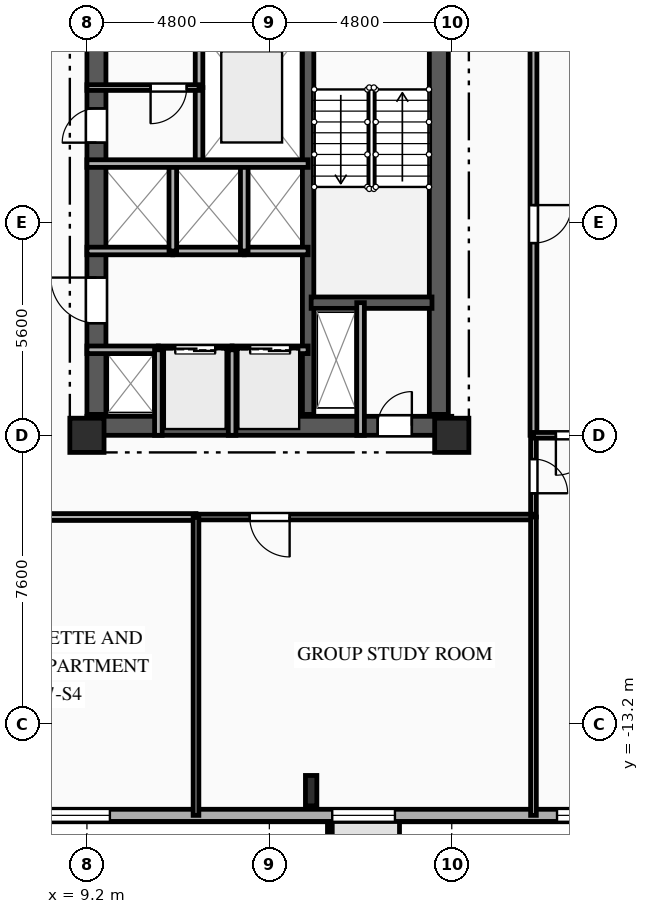
"""IFC4 building model, lengths in metres.
Left out: names, types, materials, properties, quantities, classifications, styles, units other than length and angle.
Written with IfcOpenShell. Run it as: python <this file> out.ifc"""

import sys

from ifc_helpers import new_model, si_unit, direction, frame, frame_2d, origin, origin_2d, place, context, subcontext, project, spatial, rectangle, i_section, extrude, element, fill, save


model = new_model("IFC4")
c1 = context("Model", 3, precision=1e-05, world=origin(), true_north=direction((0.0, 1.0)))
c2 = subcontext(c1, "Body", "Model", "MODEL_VIEW")
j1 = project(units=[si_unit("LENGTHUNIT", "METRE"), si_unit("PLANEANGLEUNIT", "RADIAN")], contexts=[c1])
p1 = place(None, origin())
s1 = spatial("IfcSite", under=j1, at=p1, CompositionType="ELEMENT")
p2 = place(p1, origin())
s2 = spatial("IfcBuilding", under=s1, at=p2, CompositionType="ELEMENT")
p3 = place(p2, frame((0.0, 0.0, 134.35)))
s3 = spatial("IfcBuildingStorey", under=s2, at=p3, CompositionType="ELEMENT", Elevation=134.35)
for number, where, z_axis, x_axis in (
    (1, (9.2, -5.6, 0.0), (0.0, 0.0, 1.0), (1.0, 0.0, 0.0)),
    (2, (18.8, -5.6, 0.0), (0.0, 0.0, 1.0), (1.0, 0.0, 0.0)),
):
    element("IfcColumn", number, at=place(p3, frame(where, z_axis=z_axis, x_axis=x_axis)), inside=s3, PredefinedType="COLUMN", context=c2, shape_type="SweptSolid", body=[
        extrude(rectangle(XDim=0.9, YDim=0.9, at=origin_2d()), origin(), (0.0, 0.0, 1.0), 3.35),
    ])
p4 = place(p3, frame((15.1, -14.95, 0.0), z_axis=(0.0, 0.0, 1.0), x_axis=(1.0, 0.0, 0.0)))
e3 = element("IfcColumn", 3, at=p4, inside=s3, PredefinedType="COLUMN", context=c2, shape_type="SweptSolid", body=[
    extrude(i_section(OverallWidth=0.3, OverallDepth=0.8, WebThickness=0.018, FlangeThickness=0.033, FilletRadius=0.03, at=origin_2d()), origin(), (0.0, 0.0, 1.0), 3.35),
])
p5 = place(p3, frame((23.8, -15.6, 0.0), z_axis=(0.0, 0.0, 1.0), x_axis=(-1.0, 0.0, 0.0)))
e4 = element("IfcWall", 4, at=p5, inside=s3, PredefinedType="SOLIDWALL", context=c2, shape_type="SweptSolid", body=[
    extrude(rectangle(XDim=49.6, YDim=0.32, at=frame_2d((24.8, 0.0))), origin(), (0.0, 0.0, 1.0), 3.04),
])
p6 = place(p5, frame((1.13, 0.0, 0.85)))
e5 = element("IfcOpeningElement", 5, at=p6, cuts=e4, PredefinedType="OPENING", context=c2, shape_type="SweptSolid", body=[
    extrude(rectangle(XDim=1.1, YDim=1.85, at=frame_2d((0.55, 0.925))), frame((0.0, 0.17, 0.0), z_axis=(0.0, -1.0, 0.0), x_axis=(1.0, 0.0, 0.0)), (0.0, 0.0, 1.0), 0.34),
])
p7 = place(p5, frame((6.495, 0.0, 0.85)))
e6 = element("IfcOpeningElement", 6, at=p7, cuts=e4, PredefinedType="OPENING", context=c2, shape_type="SweptSolid", body=[
    extrude(rectangle(XDim=1.65, YDim=1.85, at=frame_2d((0.825, 0.925))), frame((0.0, 0.17, 0.0), z_axis=(0.0, -1.0, 0.0), x_axis=(1.0, 0.0, 0.0)), (0.0, 0.0, 1.0), 0.34),
])
p8 = place(p5, frame((13.996, 0.0, 0.85)))
e7 = element("IfcOpeningElement", 7, at=p8, cuts=e4, PredefinedType="OPENING", context=c2, shape_type="SweptSolid", body=[
    extrude(rectangle(XDim=2.2, YDim=1.85, at=frame_2d((1.1, 0.925))), frame((0.0, 0.17, 0.0), z_axis=(0.0, -1.0, 0.0), x_axis=(1.0, 0.0, 0.0)), (0.0, 0.0, 1.0), 0.34),
])
p9 = place(p5, frame((22.396, 0.0, 0.85)))
e8 = element("IfcOpeningElement", 8, at=p9, cuts=e4, PredefinedType="OPENING", context=c2, shape_type="SweptSolid", body=[
    extrude(rectangle(XDim=2.2, YDim=1.85, at=frame_2d((1.1, 0.925))), frame((0.0, 0.17, 0.0), z_axis=(0.0, -1.0, 0.0), x_axis=(1.0, 0.0, 0.0)), (0.0, 0.0, 1.0), 0.34),
])
p10 = place(p5, frame((30.2, 0.0, 0.85)))
e9 = element("IfcOpeningElement", 9, at=p10, cuts=e4, PredefinedType="OPENING", context=c2, shape_type="SweptSolid", body=[
    extrude(rectangle(XDim=2.2, YDim=1.85, at=frame_2d((1.1, 0.925))), frame((0.0, 0.17, 0.0), z_axis=(0.0, -1.0, 0.0), x_axis=(1.0, 0.0, 0.0)), (0.0, 0.0, 1.0), 0.34),
])
p11 = place(p5, frame((38.673, 0.0, 0.85)))
e10 = element("IfcOpeningElement", 10, at=p11, cuts=e4, PredefinedType="OPENING", context=c2, shape_type="SweptSolid", body=[
    extrude(rectangle(XDim=1.65, YDim=1.85, at=frame_2d((0.825, 0.925))), frame((0.0, 0.17, 0.0), z_axis=(0.0, -1.0, 0.0), x_axis=(1.0, 0.0, 0.0)), (0.0, 0.0, 1.0), 0.34),
])
p12 = place(p5, frame((46.175, 0.0, 0.85)))
e11 = element("IfcOpeningElement", 11, at=p12, cuts=e4, PredefinedType="OPENING", context=c2, shape_type="SweptSolid", body=[
    extrude(rectangle(XDim=1.65, YDim=1.85, at=frame_2d((0.825, 0.925))), frame((0.0, 0.17, 0.0), z_axis=(0.0, -1.0, 0.0), x_axis=(1.0, 0.0, 0.0)), (0.0, 0.0, 1.0), 0.34),
])
p13 = place(p3, frame((9.2, -5.35, 0.0), z_axis=(0.0, 0.0, 1.0), x_axis=(1.0, 0.0, 0.0)))
e12 = element("IfcWall", 12, at=p13, inside=s3, PredefinedType="SHEAR", context=c2, shape_type="SweptSolid", body=[
    extrude(rectangle(XDim=9.6, YDim=0.5, at=frame_2d((4.8, 0.0))), origin(), (0.0, 0.0, 1.0), 3.04),
])
p14 = place(p13, frame((7.65, 0.0, 0.0)))
e13 = element("IfcOpeningElement", 13, at=p14, cuts=e12, PredefinedType="OPENING", context=c2, shape_type="SweptSolid", body=[
    extrude(rectangle(XDim=0.9, YDim=2.1, at=frame_2d((0.45, 1.05))), frame((0.0, 0.26, 0.0), z_axis=(0.0, -1.0, 0.0), x_axis=(1.0, 0.0, 0.0)), (0.0, 0.0, 1.0), 0.52),
])
p15 = place(p3, frame((9.45, -5.05, 0.0), z_axis=(0.0, 0.0, 1.0), x_axis=(0.0, 1.0, 0.0)))
e14 = element("IfcWall", 14, at=p15, inside=s3, PredefinedType="SHEAR", context=c2, shape_type="SweptSolid", body=[
    extrude(rectangle(XDim=10.1, YDim=0.5, at=frame_2d((5.05, 0.0))), origin(), (0.0, 0.0, 1.0), 3.04),
])
p16 = place(p15, frame((7.15, 0.0, 0.0)))
e15 = element("IfcOpeningElement", 15, at=p16, cuts=e14, PredefinedType="OPENING", context=c2, shape_type="SweptSolid", body=[
    extrude(rectangle(XDim=0.9, YDim=2.1, at=frame_2d((0.45, 1.05))), frame((0.0, 0.26, 0.0), z_axis=(0.0, -1.0, 0.0), x_axis=(1.0, 0.0, 0.0)), (0.0, 0.0, 1.0), 0.52),
])
p17 = place(p15, frame((2.4, 0.0, 0.0)))
e16 = element("IfcOpeningElement", 16, at=p17, cuts=e14, PredefinedType="OPENING", context=c2, shape_type="SweptSolid", body=[
    extrude(rectangle(XDim=1.2, YDim=2.15, at=frame_2d((0.6, 1.075))), frame((0.0, 0.26, 0.0), z_axis=(0.0, -1.0, 0.0), x_axis=(1.0, 0.0, 0.0)), (0.0, 0.0, 1.0), 0.52),
])
p18 = place(p3, frame((18.46, -5.05, 0.0), z_axis=(0.0, 0.0, 1.0), x_axis=(0.0, 1.0, 0.0)))
e17 = element("IfcWall", 17, at=p18, inside=s3, PredefinedType="SHEAR", context=c2, shape_type="SweptSolid", body=[
    extrude(rectangle(XDim=10.1, YDim=0.5, at=frame_2d((5.05, 0.0))), origin(), (0.0, 0.0, 1.0), 3.04),
])
p19 = place(p3, frame((15.02, -5.05, 0.0), z_axis=(0.0, 0.0, 1.0), x_axis=(0.0, 1.0, 0.0)))
e18 = element("IfcWall", 18, at=p19, inside=s3, PredefinedType="SHEAR", context=c2, shape_type="SweptSolid", body=[
    extrude(rectangle(XDim=10.1, YDim=0.3, at=frame_2d((5.05, 0.0))), origin(), (0.0, 0.0, 1.0), 3.04),
])
p20 = place(p3, frame((15.1, -2.11, 0.0), z_axis=(0.0, 0.0, 1.0), x_axis=(1.0, 0.0, 0.0)))
e19 = element("IfcWall", 19, at=p20, inside=s3, PredefinedType="SHEAR", context=c2, shape_type="SweptSolid", body=[
    extrude(rectangle(XDim=3.18, YDim=0.3, at=frame_2d((1.59, 0.0))), origin(), (0.0, 0.0, 1.0), 3.04),
])
p21 = place(p3, frame((16.4, -2.11, 0.0), z_axis=(0.0, 0.0, 1.0), x_axis=(0.0, -1.0, 0.0)))
e20 = element("IfcWall", 20, at=p21, inside=s3, PredefinedType="PARTITIONING", context=c2, shape_type="SweptSolid", body=[
    extrude(rectangle(XDim=3.49, YDim=0.2, at=frame_2d((1.745, 0.0))), origin(), (0.0, 0.0, 1.0), 3.04),
])
p22 = place(p3, frame((12.15, 3.55, 0.0), z_axis=(0.0, 0.0, 1.0), x_axis=(0.0, -1.0, 0.0)))
e21 = element("IfcWall", 21, at=p22, inside=s3, PredefinedType="PARTITIONING", context=c2, shape_type="SweptSolid", body=[
    extrude(rectangle(XDim=2.0, YDim=0.2, at=frame_2d((1.0, 0.0))), origin(), (0.0, 0.0, 1.0), 3.04),
])
p23 = place(p3, frame((12.15, 5.6, 0.0), z_axis=(0.0, 0.0, 1.0), x_axis=(0.0, -1.0, 0.0)))
e22 = element("IfcWall", 22, at=p23, inside=s3, PredefinedType="PARTITIONING", context=c2, shape_type="SweptSolid", body=[
    extrude(rectangle(XDim=2.05, YDim=0.2, at=frame_2d((1.025, 0.0))), origin(), (0.0, 0.0, 1.0), 3.04),
])
p24 = place(p3, frame((12.15, 3.55, 0.0), z_axis=(0.0, 0.0, 1.0), x_axis=(-1.0, 0.0, 0.0)))
e23 = element("IfcWall", 23, at=p24, inside=s3, PredefinedType="PARTITIONING", context=c2, shape_type="SweptSolid", body=[
    extrude(rectangle(XDim=2.95, YDim=0.15, at=frame_2d((1.475, 0.0))), origin(), (0.0, 0.0, 1.0), 3.04),
])
p25 = place(p24, frame((0.325, 0.0, 0.0)))
e24 = element("IfcOpeningElement", 24, at=p25, cuts=e23, PredefinedType="OPENING", context=c2, shape_type="SweptSolid", body=[
    extrude(rectangle(XDim=0.95, YDim=2.1, at=frame_2d((0.475, 1.05))), frame((0.0, 0.085, 0.0), z_axis=(0.0, -1.0, 0.0), x_axis=(1.0, 0.0, 0.0)), (0.0, 0.0, 1.0), 0.17),
])
p26 = place(p3, frame((9.2, -3.35, 0.0), z_axis=(0.0, 0.0, 1.0), x_axis=(1.0, 0.0, 0.0)))
e25 = element("IfcWall", 25, at=p26, inside=s3, PredefinedType="PARTITIONING", context=c2, shape_type="SweptSolid", body=[
    extrude(rectangle(XDim=1.88, YDim=0.2, at=frame_2d((0.94, 0.0))), origin(), (0.0, 0.0, 1.0), 2.755),
])
p27 = place(p3, frame((11.08, -3.35, 0.0), z_axis=(0.0, 0.0, 1.0), x_axis=(1.0, 0.0, 0.0)))
e26 = element("IfcWall", 26, at=p27, inside=s3, PredefinedType="PARTITIONING", context=c2, shape_type="SweptSolid", body=[
    extrude(rectangle(XDim=1.94, YDim=0.2, at=frame_2d((0.97, 0.0))), origin(), (0.0, 0.0, 1.0), 3.04),
])
p28 = place(p27, frame((0.445, 0.0, 0.0)))
e27 = element("IfcOpeningElement", 27, at=p28, cuts=e26, PredefinedType="OPENING", context=c2, shape_type="SweptSolid", body=[
    extrude(rectangle(XDim=1.05, YDim=2.1, at=frame_2d((0.525, 1.05))), frame((0.0, 0.11, 0.0), z_axis=(0.0, -1.0, 0.0), x_axis=(1.0, 0.0, 0.0)), (0.0, 0.0, 1.0), 0.22),
])
p29 = place(p3, frame((13.02, -3.35, 0.0), z_axis=(0.0, 0.0, 1.0), x_axis=(1.0, 0.0, 0.0)))
e28 = element("IfcWall", 28, at=p29, inside=s3, PredefinedType="PARTITIONING", context=c2, shape_type="SweptSolid", body=[
    extrude(rectangle(XDim=2.0, YDim=0.2, at=frame_2d((1.0, 0.0))), origin(), (0.0, 0.0, 1.0), 3.04),
])
p30 = place(p29, frame((0.475, 0.0, 0.0)))
e29 = element("IfcOpeningElement", 29, at=p30, cuts=e28, PredefinedType="OPENING", context=c2, shape_type="SweptSolid", body=[
    extrude(rectangle(XDim=1.05, YDim=2.1, at=frame_2d((0.525, 1.05))), frame((0.0, 0.11, 0.0), z_axis=(0.0, -1.0, 0.0), x_axis=(1.0, 0.0, 0.0)), (0.0, 0.0, 1.0), 0.22),
])
p31 = place(p3, frame((11.46, -0.75, 0.0), z_axis=(0.0, 0.0, 1.0), x_axis=(-1.0, 0.0, 0.0)))
e30 = element("IfcWall", 30, at=p31, inside=s3, PredefinedType="PARTITIONING", context=c2, shape_type="SweptSolid", body=[
    extrude(rectangle(XDim=2.26, YDim=0.2, at=frame_2d((1.13, 0.0))), origin(), (0.0, 0.0, 1.0), 3.04),
])
p32 = place(p3, frame((13.34, -0.75, 0.0), z_axis=(0.0, 0.0, 1.0), x_axis=(-1.0, 0.0, 0.0)))
e31 = element("IfcWall", 31, at=p32, inside=s3, PredefinedType="PARTITIONING", context=c2, shape_type="SweptSolid", body=[
    extrude(rectangle(XDim=1.88, YDim=0.2, at=frame_2d((0.94, 0.0))), origin(), (0.0, 0.0, 1.0), 3.04),
])
p33 = place(p3, frame((15.02, -0.75, 0.0), z_axis=(0.0, 0.0, 1.0), x_axis=(-1.0, 0.0, 0.0)))
e32 = element("IfcWall", 32, at=p33, inside=s3, PredefinedType="PARTITIONING", context=c2, shape_type="SweptSolid", body=[
    extrude(rectangle(XDim=1.68, YDim=0.2, at=frame_2d((0.84, 0.0))), origin(), (0.0, 0.0, 1.0), 3.04),
])
for number, where, z_axis, x_axis in (
    (33, (11.08, -5.6, 0.0), (0.0, 0.0, 1.0), (0.0, 1.0, 0.0)),
    (34, (13.02, -5.6, 0.0), (0.0, 0.0, 1.0), (0.0, 1.0, 0.0)),
):
    element("IfcWall", number, at=place(p3, frame(where, z_axis=z_axis, x_axis=x_axis)), inside=s3, PredefinedType="PARTITIONING", context=c2, shape_type="SweptSolid", body=[
        extrude(rectangle(XDim=2.25, YDim=0.2, at=frame_2d((1.125, 0.0))), origin(), (0.0, 0.0, 1.0), 3.04),
    ])
for number, where, z_axis, x_axis in (
    (35, (11.46, -0.75, 0.0), (0.0, 0.0, 1.0), (0.0, 1.0, 0.0)),
    (36, (13.34, -0.75, 0.0), (0.0, 0.0, 1.0), (0.0, 1.0, 0.0)),
):
    element("IfcWall", number, at=place(p3, frame(where, z_axis=z_axis, x_axis=x_axis)), inside=s3, PredefinedType="PARTITIONING", context=c2, shape_type="SweptSolid", body=[
        extrude(rectangle(XDim=2.3, YDim=0.2, at=frame_2d((1.15, 0.0))), origin(), (0.0, 0.0, 1.0), 3.04),
    ])
p34 = place(p3, frame((20.95, -5.6, 0.0), z_axis=(0.0, 0.0, 1.0), x_axis=(0.0, -1.0, 0.0)))
e37 = element("IfcWall", 37, at=p34, inside=s3, PredefinedType="PARTITIONING", context=c2, shape_type="SweptSolid", body=[
    extrude(rectangle(XDim=2.15, YDim=0.15, at=frame_2d((1.075, 0.0))), origin(), (0.0, 0.0, 1.0), 3.04),
])
p35 = place(p34, frame((0.625, 0.0, 0.0)))
e38 = element("IfcOpeningElement", 38, at=p35, cuts=e37, PredefinedType="OPENING", context=c2, shape_type="SweptSolid", body=[
    extrude(rectangle(XDim=0.9, YDim=2.1, at=frame_2d((0.45, 1.05))), frame((0.0, 0.085, 0.0), z_axis=(0.0, -1.0, 0.0), x_axis=(1.0, 0.0, 0.0)), (0.0, 0.0, 1.0), 0.17),
])
p36 = place(p3, frame((12.07, -7.75, 0.0), z_axis=(0.0, 0.0, 1.0), x_axis=(-1.0, 0.0, 0.0)))
e39 = element("IfcWall", 39, at=p36, inside=s3, PredefinedType="PARTITIONING", context=c2, shape_type="SweptSolid", body=[
    extrude(rectangle(XDim=5.93, YDim=0.18, at=frame_2d((2.965, 0.0))), origin(), (0.0, 0.0, 1.0), 3.04),
])
p37 = place(p36, frame((3.879, 0.0, 0.0)))
e40 = element("IfcOpeningElement", 40, at=p37, cuts=e39, PredefinedType="OPENING", context=c2, shape_type="SweptSolid", body=[
    extrude(rectangle(XDim=1.0, YDim=2.15, at=frame_2d((0.5, 1.075))), frame((0.0, 0.1, 0.0), z_axis=(0.0, -1.0, 0.0), x_axis=(1.0, 0.0, 0.0)), (0.0, 0.0, 1.0), 0.2),
])
p38 = place(p3, frame((20.95, -7.75, 0.0), z_axis=(0.0, 0.0, 1.0), x_axis=(-1.0, 0.0, 0.0)))
e41 = element("IfcWall", 41, at=p38, inside=s3, PredefinedType="PARTITIONING", context=c2, shape_type="SweptSolid", body=[
    extrude(rectangle(XDim=8.88, YDim=0.15, at=frame_2d((4.44, 0.0))), origin(), (0.0, 0.0, 1.0), 3.04),
])
p39 = place(p38, frame((6.416, 0.0, 0.0)))
e42 = element("IfcOpeningElement", 42, at=p39, cuts=e41, PredefinedType="OPENING", context=c2, shape_type="SweptSolid", body=[
    extrude(rectangle(XDim=1.05, YDim=2.15, at=frame_2d((0.525, 1.075))), frame((0.0, 0.085, 0.0), z_axis=(0.0, -1.0, 0.0), x_axis=(1.0, 0.0, 0.0)), (0.0, 0.0, 1.0), 0.17),
])
p40 = place(p3, frame((20.95, 8.5, 0.0), z_axis=(0.0, 0.0, 1.0), x_axis=(0.0, -1.0, 0.0)))
e43 = element("IfcWall", 43, at=p40, inside=s3, PredefinedType="PARTITIONING", context=c2, shape_type="SweptSolid", body=[
    extrude(rectangle(XDim=14.1, YDim=0.18, at=frame_2d((7.05, 0.0))), origin(), (0.0, 0.0, 1.0), 3.04),
])
p41 = place(p40, frame((8.042, 0.0, 0.0)))
e44 = element("IfcOpeningElement", 44, at=p41, cuts=e43, PredefinedType="OPENING", context=c2, shape_type="SweptSolid", body=[
    extrude(rectangle(XDim=1.0, YDim=2.15, at=frame_2d((0.5, 1.075))), frame((0.0, 0.1, 0.0), z_axis=(0.0, -1.0, 0.0), x_axis=(1.0, 0.0, 0.0)), (0.0, 0.0, 1.0), 0.2),
])
p42 = place(p3, frame((23.18, -5.6, 0.0), z_axis=(0.0, 0.0, 1.0), x_axis=(-1.0, 0.0, 0.0)))
e45 = element("IfcWall", 45, at=p42, inside=s3, PredefinedType="PARTITIONING", context=c2, shape_type="SweptSolid", body=[
    extrude(rectangle(XDim=2.23, YDim=0.15, at=frame_2d((1.115, 0.0))), origin(), (0.0, 0.0, 1.0), 3.04),
])
p43 = place(p42, frame((0.59, 0.0, 0.0)))
e46 = element("IfcOpeningElement", 46, at=p43, cuts=e45, PredefinedType="OPENING", context=c2, shape_type="SweptSolid", body=[
    extrude(rectangle(XDim=1.05, YDim=2.15, at=frame_2d((0.525, 1.075))), frame((0.0, 0.085, 0.0), z_axis=(0.0, -1.0, 0.0), x_axis=(1.0, 0.0, 0.0)), (0.0, 0.0, 1.0), 0.17),
])
for number, where, z_axis, x_axis in (
    (47, (20.95, -15.6, 0.0), (0.0, 0.0, 1.0), (0.0, 1.0, 0.0)),
    (48, (12.07, -7.75, 0.0), (0.0, 0.0, 1.0), (0.0, -1.0, 0.0)),
):
    element("IfcWall", number, at=place(p3, frame(where, z_axis=z_axis, x_axis=x_axis)), inside=s3, PredefinedType="PARTITIONING", context=c2, shape_type="SweptSolid", body=[
        extrude(rectangle(XDim=7.85, YDim=0.15, at=frame_2d((3.925, 0.0))), origin(), (0.0, 0.0, 1.0), 3.04),
    ])
p44 = place(p3, frame((9.2, 1.55, 0.0), z_axis=(0.0, 0.0, 1.0), x_axis=(1.0, 0.0, 0.0)))
e49 = element("IfcWall", 49, at=p44, inside=s3, PredefinedType="PARTITIONING", context=c2, shape_type="SweptSolid", body=[
    extrude(rectangle(XDim=5.82, YDim=0.2, at=frame_2d((2.91, 0.0))), origin(), (0.0, 0.0, 1.0), 3.04),
])
p45 = place(p6, origin())
e50 = element("IfcWindow", 50, at=p45, inside=s3, PartitioningType="SINGLE_PANEL", PredefinedType="WINDOW", context=c2, shape_type="SweptSolid", body=[
    extrude(rectangle(XDim=1.1, YDim=1.85, at=frame_2d((0.55, 0.925))), frame((0.0, 0.03, 0.0), z_axis=(0.0, -1.0, 0.0), x_axis=(1.0, 0.0, 0.0)), (0.0, 0.0, 1.0), 0.06),
])
fill(e5, e50)
p46 = place(p7, origin())
e51 = element("IfcWindow", 51, at=p46, inside=s3, PartitioningType="SINGLE_PANEL", PredefinedType="WINDOW", context=c2, shape_type="SweptSolid", body=[
    extrude(rectangle(XDim=1.65, YDim=1.85, at=frame_2d((0.825, 0.925))), frame((0.0, 0.03, 0.0), z_axis=(0.0, -1.0, 0.0), x_axis=(1.0, 0.0, 0.0)), (0.0, 0.0, 1.0), 0.06),
])
fill(e6, e51)
p47 = place(p8, origin())
e52 = element("IfcWindow", 52, at=p47, inside=s3, PartitioningType="SINGLE_PANEL", PredefinedType="WINDOW", context=c2, shape_type="SweptSolid", body=[
    extrude(rectangle(XDim=2.2, YDim=1.85, at=frame_2d((1.1, 0.925))), frame((0.0, 0.03, 0.0), z_axis=(0.0, -1.0, 0.0), x_axis=(1.0, 0.0, 0.0)), (0.0, 0.0, 1.0), 0.06),
])
fill(e7, e52)
p48 = place(p14, origin())
e53 = element("IfcDoor", 53, at=p48, inside=s3, OperationType="SINGLE_SWING_RIGHT", PredefinedType="DOOR", context=c2, shape_type="SweptSolid", body=[
    extrude(rectangle(XDim=0.9, YDim=2.1, at=frame_2d((0.45, 1.05))), frame((0.0, 0.025, 0.0), z_axis=(0.0, -1.0, 0.0), x_axis=(1.0, 0.0, 0.0)), (0.0, 0.0, 1.0), 0.05),
])
fill(e13, e53)
p49 = place(p25, origin())
e54 = element("IfcDoor", 54, at=p49, inside=s3, OperationType="SINGLE_SWING_RIGHT", PredefinedType="DOOR", context=c2, shape_type="SweptSolid", body=[
    extrude(rectangle(XDim=0.95, YDim=2.1, at=frame_2d((0.475, 1.05))), frame((0.0, 0.025, 0.0), z_axis=(0.0, -1.0, 0.0), x_axis=(1.0, 0.0, 0.0)), (0.0, 0.0, 1.0), 0.05),
])
fill(e24, e54)
p50 = place(p16, origin())
e55 = element("IfcDoor", 55, at=p50, inside=s3, OperationType="SINGLE_SWING_LEFT", PredefinedType="DOOR", context=c2, shape_type="SweptSolid", body=[
    extrude(rectangle(XDim=0.9, YDim=2.1, at=frame_2d((0.45, 1.05))), frame((0.0, 0.025, 0.0), z_axis=(0.0, -1.0, 0.0), x_axis=(1.0, 0.0, 0.0)), (0.0, 0.0, 1.0), 0.05),
])
fill(e15, e55)
p51 = place(p28, origin())
e56 = element("IfcDoor", 56, at=p51, inside=s3, OperationType="DOUBLE_DOOR_SLIDING", PredefinedType="DOOR", context=c2, shape_type="SweptSolid", body=[
    extrude(rectangle(XDim=1.05, YDim=2.1, at=frame_2d((0.525, 1.05))), frame((0.0, 0.025, 0.0), z_axis=(0.0, -1.0, 0.0), x_axis=(1.0, 0.0, 0.0)), (0.0, 0.0, 1.0), 0.05),
])
fill(e27, e56)
p52 = place(p30, origin())
e57 = element("IfcDoor", 57, at=p52, inside=s3, OperationType="DOUBLE_DOOR_SLIDING", PredefinedType="DOOR", context=c2, shape_type="SweptSolid", body=[
    extrude(rectangle(XDim=1.05, YDim=2.1, at=frame_2d((0.525, 1.05))), frame((0.0, 0.025, 0.0), z_axis=(0.0, -1.0, 0.0), x_axis=(1.0, 0.0, 0.0)), (0.0, 0.0, 1.0), 0.05),
])
fill(e29, e57)
p53 = place(p17, origin())
e58 = element("IfcDoor", 58, at=p53, inside=s3, OperationType="SINGLE_SWING_RIGHT", PredefinedType="DOOR", context=c2, shape_type="SweptSolid", body=[
    extrude(rectangle(XDim=1.2, YDim=2.15, at=frame_2d((0.6, 1.075))), frame((0.0, 0.025, 0.0), z_axis=(0.0, -1.0, 0.0), x_axis=(1.0, 0.0, 0.0)), (0.0, 0.0, 1.0), 0.05),
])
fill(e16, e58)
p54 = place(p35, origin())
e59 = element("IfcDoor", 59, at=p54, inside=s3, OperationType="SINGLE_SWING_RIGHT", PredefinedType="DOOR", context=c2, shape_type="SweptSolid", body=[
    extrude(rectangle(XDim=0.9, YDim=2.1, at=frame_2d((0.45, 1.05))), frame((0.0, 0.025, 0.0), z_axis=(0.0, -1.0, 0.0), x_axis=(1.0, 0.0, 0.0)), (0.0, 0.0, 1.0), 0.05),
])
fill(e38, e59)
p55 = place(p39, origin())
e60 = element("IfcDoor", 60, at=p55, inside=s3, OperationType="SINGLE_SWING_LEFT", PredefinedType="DOOR", context=c2, shape_type="SweptSolid", body=[
    extrude(rectangle(XDim=1.05, YDim=2.15, at=frame_2d((0.525, 1.075))), frame((0.0, 0.025, 0.0), z_axis=(0.0, -1.0, 0.0), x_axis=(1.0, 0.0, 0.0)), (0.0, 0.0, 1.0), 0.05),
])
fill(e42, e60)
p56 = place(p41, origin())
e61 = element("IfcDoor", 61, at=p56, inside=s3, OperationType="SINGLE_SWING_LEFT", PredefinedType="DOOR", context=c2, shape_type="SweptSolid", body=[
    extrude(rectangle(XDim=1.0, YDim=2.15, at=frame_2d((0.5, 1.075))), frame((0.0, 0.025, 0.0), z_axis=(0.0, -1.0, 0.0), x_axis=(1.0, 0.0, 0.0)), (0.0, 0.0, 1.0), 0.05),
])
fill(e44, e61)
p57 = place(p43, origin())
e62 = element("IfcDoor", 62, at=p57, inside=s3, OperationType="SINGLE_SWING_RIGHT", PredefinedType="DOOR", context=c2, shape_type="SweptSolid", body=[
    extrude(rectangle(XDim=1.05, YDim=2.15, at=frame_2d((0.525, 1.075))), frame((0.0, 0.025, 0.0), z_axis=(0.0, -1.0, 0.0), x_axis=(1.0, 0.0, 0.0)), (0.0, 0.0, 1.0), 0.05),
])
fill(e46, e62)
save(model, sys.argv[1])
